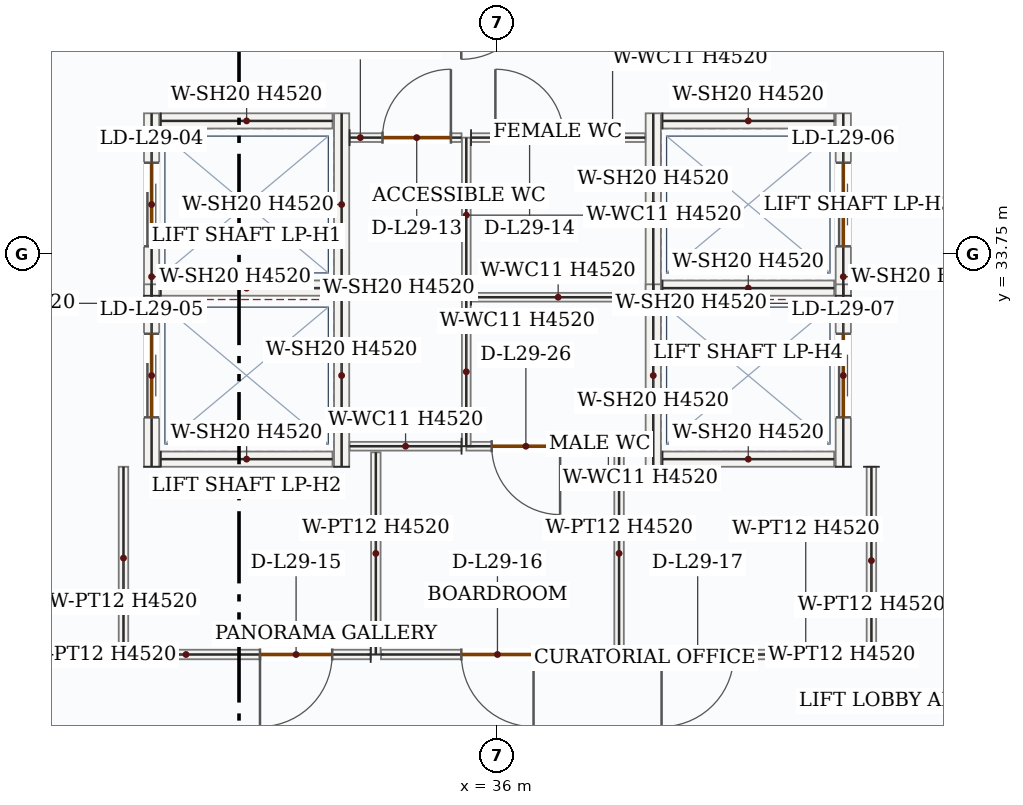
"""IFC4 building model, lengths in metres.
Left out: names, types, materials, properties, quantities, classifications, styles, units other than length and angle.
Written with IfcOpenShell. Run it as: python <this file> out.ifc"""

import sys

from ifc_helpers import new_model, si_unit, direction, frame, frame_2d, origin, place, context, subcontext, project, spatial, rectangle, extrude, source, transform, mapped, element, fill, save


model = new_model("IFC4")
c1 = context("Model", 3, precision=1e-05, world=origin(), true_north=direction((0.0, 1.0)))
c2 = subcontext(c1, "Body", "Model", "MODEL_VIEW")
j1 = project(units=[si_unit("LENGTHUNIT", "METRE"), si_unit("PLANEANGLEUNIT", "RADIAN")], contexts=[c1])
p1 = place(None, origin())
s1 = spatial("IfcSite", under=j1, at=p1, CompositionType="ELEMENT")
p2 = place(p1, origin())
s2 = spatial("IfcBuilding", under=s1, at=p2, CompositionType="ELEMENT")
p3 = place(p2, frame((0.0, 0.0, 130.8)))
s3 = spatial("IfcBuildingStorey", under=s2, at=p3, CompositionType="ELEMENT", Elevation=130.8)
p4 = place(p3, frame((31.45, 33.2, 0.0), z_axis=(0.0, 0.0, 1.0), x_axis=(0.0, 1.0, 0.0)))
e1 = element("IfcWall", 1, at=p4, inside=s3, PredefinedType="SOLIDWALL", context=c2, shape_type="SweptSolid", body=[
    extrude(rectangle(XDim=2.4, YDim=0.2, at=frame_2d((1.2, 0.0))), origin(), (0.0, 0.0, 1.0), 4.52),
])
p5 = place(p4, frame((0.65, 0.0, 0.0)))
e2 = element("IfcOpeningElement", 2, at=p5, cuts=e1, PredefinedType="OPENING", context=c2, shape_type="SweptSolid", body=[
    extrude(rectangle(XDim=1.1, YDim=2.15, at=frame_2d((0.55, 1.075))), frame((0.0, 0.11, 0.0), z_axis=(0.0, -1.0, 0.0), x_axis=(1.0, 0.0, 0.0)), (0.0, 0.0, 1.0), 0.22),
])
m1 = source(origin(), c2, "Body", "SweptSolid", [
    extrude(rectangle(XDim=2.4, YDim=0.2, at=frame_2d((1.2, 0.0))), origin(), (0.0, 0.0, 1.0), 4.52),
])
p6 = place(p3, frame((33.95, 33.2, 0.0), z_axis=(0.0, 0.0, 1.0), x_axis=(0.0, 1.0, 0.0)))
e3 = element("IfcWall", 3, at=p6, inside=s3, PredefinedType="SOLIDWALL", context=c2, shape_type="MappedRepresentation", body=[
    mapped(m1, transform((0.0, 0.0, 0.0), x_axis=(1.0, 0.0, 0.0), y_axis=(0.0, 1.0, 0.0), z_axis=(0.0, 0.0, 1.0), scale=1.0)),
])
m2 = source(origin(), c2, "Body", "SweptSolid", [
    extrude(rectangle(XDim=2.26, YDim=0.2, at=frame_2d((1.13, 0.0))), origin(), (0.0, 0.0, 1.0), 4.52),
])
for number, where, z_axis, x_axis in (
    (4, (31.57, 33.3, 0.0), (0.0, 0.0, 1.0), (1.0, 0.0, 0.0)),
    (5, (31.57, 35.5, 0.0), (0.0, 0.0, 1.0), (1.0, 0.0, 0.0)),
):
    element("IfcWall", number, at=place(p3, frame(where, z_axis=z_axis, x_axis=x_axis)), inside=s3, PredefinedType="SOLIDWALL", context=c2, shape_type="MappedRepresentation", body=[
        mapped(m2, transform((0.0, 0.0, 0.0), x_axis=(1.0, 0.0, 0.0), y_axis=(0.0, 1.0, 0.0), z_axis=(0.0, 0.0, 1.0), scale=1.0)),
    ])
p7 = place(p3, frame((31.45, 30.95, 0.0), z_axis=(0.0, 0.0, 1.0), x_axis=(0.0, 1.0, 0.0)))
e6 = element("IfcWall", 6, at=p7, inside=s3, PredefinedType="SOLIDWALL", context=c2, shape_type="SweptSolid", body=[
    extrude(rectangle(XDim=2.4, YDim=0.2, at=frame_2d((1.2, 0.0))), origin(), (0.0, 0.0, 1.0), 4.52),
])
p8 = place(p7, frame((0.65, 0.0, 0.0)))
e7 = element("IfcOpeningElement", 7, at=p8, cuts=e6, PredefinedType="OPENING", context=c2, shape_type="SweptSolid", body=[
    extrude(rectangle(XDim=1.1, YDim=2.15, at=frame_2d((0.55, 1.075))), frame((0.0, 0.11, 0.0), z_axis=(0.0, -1.0, 0.0), x_axis=(1.0, 0.0, 0.0)), (0.0, 0.0, 1.0), 0.22),
])
p9 = place(p3, frame((33.95, 30.95, 0.0), z_axis=(0.0, 0.0, 1.0), x_axis=(0.0, 1.0, 0.0)))
e8 = element("IfcWall", 8, at=p9, inside=s3, PredefinedType="SOLIDWALL", context=c2, shape_type="MappedRepresentation", body=[
    mapped(m1, transform((0.0, 0.0, 0.0), x_axis=(1.0, 0.0, 0.0), y_axis=(0.0, 1.0, 0.0), z_axis=(0.0, 0.0, 1.0), scale=1.0)),
])
p10 = place(p3, frame((31.57, 31.05, 0.0), z_axis=(0.0, 0.0, 1.0), x_axis=(1.0, 0.0, 0.0)))
e9 = element("IfcWall", 9, at=p10, inside=s3, PredefinedType="SOLIDWALL", context=c2, shape_type="MappedRepresentation", body=[
    mapped(m2, transform((0.0, 0.0, 0.0), x_axis=(1.0, 0.0, 0.0), y_axis=(0.0, 1.0, 0.0), z_axis=(0.0, 0.0, 1.0), scale=1.0)),
])
p11 = place(p3, frame((38.05, 33.2, 0.0), z_axis=(0.0, 0.0, 1.0), x_axis=(0.0, 1.0, 0.0)))
e10 = element("IfcWall", 10, at=p11, inside=s3, PredefinedType="SOLIDWALL", context=c2, shape_type="MappedRepresentation", body=[
    mapped(m1, transform((0.0, 0.0, 0.0), x_axis=(1.0, 0.0, 0.0), y_axis=(0.0, 1.0, 0.0), z_axis=(0.0, 0.0, 1.0), scale=1.0)),
])
p12 = place(p3, frame((40.55, 33.2, 0.0), z_axis=(0.0, 0.0, 1.0), x_axis=(0.0, 1.0, 0.0)))
e11 = element("IfcWall", 11, at=p12, inside=s3, PredefinedType="SOLIDWALL", context=c2, shape_type="SweptSolid", body=[
    extrude(rectangle(XDim=2.4, YDim=0.2, at=frame_2d((1.2, 0.0))), origin(), (0.0, 0.0, 1.0), 4.52),
])
p13 = place(p12, frame((0.65, 0.0, 0.0)))
e12 = element("IfcOpeningElement", 12, at=p13, cuts=e11, PredefinedType="OPENING", context=c2, shape_type="SweptSolid", body=[
    extrude(rectangle(XDim=1.1, YDim=2.15, at=frame_2d((0.55, 1.075))), frame((0.0, 0.11, 0.0), z_axis=(0.0, -1.0, 0.0), x_axis=(1.0, 0.0, 0.0)), (0.0, 0.0, 1.0), 0.22),
])
for number, where, z_axis, x_axis in (
    (13, (38.17, 33.3, 0.0), (0.0, 0.0, 1.0), (1.0, 0.0, 0.0)),
    (14, (38.17, 35.5, 0.0), (0.0, 0.0, 1.0), (1.0, 0.0, 0.0)),
):
    element("IfcWall", number, at=place(p3, frame(where, z_axis=z_axis, x_axis=x_axis)), inside=s3, PredefinedType="SOLIDWALL", context=c2, shape_type="MappedRepresentation", body=[
        mapped(m2, transform((0.0, 0.0, 0.0), x_axis=(1.0, 0.0, 0.0), y_axis=(0.0, 1.0, 0.0), z_axis=(0.0, 0.0, 1.0), scale=1.0)),
    ])
p14 = place(p3, frame((38.05, 30.95, 0.0), z_axis=(0.0, 0.0, 1.0), x_axis=(0.0, 1.0, 0.0)))
e15 = element("IfcWall", 15, at=p14, inside=s3, PredefinedType="SOLIDWALL", context=c2, shape_type="MappedRepresentation", body=[
    mapped(m1, transform((0.0, 0.0, 0.0), x_axis=(1.0, 0.0, 0.0), y_axis=(0.0, 1.0, 0.0), z_axis=(0.0, 0.0, 1.0), scale=1.0)),
])
p15 = place(p3, frame((40.55, 30.95, 0.0), z_axis=(0.0, 0.0, 1.0), x_axis=(0.0, 1.0, 0.0)))
e16 = element("IfcWall", 16, at=p15, inside=s3, PredefinedType="SOLIDWALL", context=c2, shape_type="SweptSolid", body=[
    extrude(rectangle(XDim=2.4, YDim=0.2, at=frame_2d((1.2, 0.0))), origin(), (0.0, 0.0, 1.0), 4.52),
])
p16 = place(p15, frame((0.65, 0.0, 0.0)))
e17 = element("IfcOpeningElement", 17, at=p16, cuts=e16, PredefinedType="OPENING", context=c2, shape_type="SweptSolid", body=[
    extrude(rectangle(XDim=1.1, YDim=2.15, at=frame_2d((0.55, 1.075))), frame((0.0, 0.11, 0.0), z_axis=(0.0, -1.0, 0.0), x_axis=(1.0, 0.0, 0.0)), (0.0, 0.0, 1.0), 0.22),
])
p17 = place(p3, frame((38.17, 31.05, 0.0), z_axis=(0.0, 0.0, 1.0), x_axis=(1.0, 0.0, 0.0)))
e18 = element("IfcWall", 18, at=p17, inside=s3, PredefinedType="SOLIDWALL", context=c2, shape_type="MappedRepresentation", body=[
    mapped(m2, transform((0.0, 0.0, 0.0), x_axis=(1.0, 0.0, 0.0), y_axis=(0.0, 1.0, 0.0), z_axis=(0.0, 0.0, 1.0), scale=1.0)),
])
p18 = place(p3, frame((37.945, 31.22, 0.0), z_axis=(0.0, 0.0, 1.0), x_axis=(-1.0, 0.0, 0.0)))
e19 = element("IfcWall", 19, at=p18, inside=s3, PredefinedType="PARTITIONING", context=c2, shape_type="SweptSolid", body=[
    extrude(rectangle(XDim=2.355, YDim=0.115, at=frame_2d((1.177, 0.0))), origin(), (0.0, 0.0, 1.0), 4.52),
])
p19 = place(p18, frame((1.121, 0.0, 0.0)))
e20 = element("IfcOpeningElement", 20, at=p19, cuts=e19, PredefinedType="OPENING", context=c2, shape_type="SweptSolid", body=[
    extrude(rectangle(XDim=0.9, YDim=2.1, at=frame_2d((0.45, 1.05))), frame((0.0, 0.067, 0.0), z_axis=(0.0, -1.0, 0.0), x_axis=(1.0, 0.0, 0.0)), (0.0, 0.0, 1.0), 0.135),
])
m3 = source(origin(), c2, "Body", "SweptSolid", [
    extrude(rectangle(XDim=1.96, YDim=0.115, at=frame_2d((0.98, 0.0))), origin(), (0.0, 0.0, 1.0), 4.52),
])
p20 = place(p3, frame((35.59, 31.22, 0.0), z_axis=(0.0, 0.0, 1.0), x_axis=(0.0, 1.0, 0.0)))
e21 = element("IfcWall", 21, at=p20, inside=s3, PredefinedType="PARTITIONING", context=c2, shape_type="MappedRepresentation", body=[
    mapped(m3, transform((0.0, 0.0, 0.0), x_axis=(1.0, 0.0, 0.0), y_axis=(0.0, 1.0, 0.0), z_axis=(0.0, 0.0, 1.0), scale=1.0)),
])
m4 = source(origin(), c2, "Body", "SweptSolid", [
    extrude(rectangle(XDim=2.292, YDim=0.115, at=frame_2d((1.146, 0.0))), origin(), (0.0, 0.0, 1.0), 4.52),
])
p21 = place(p3, frame((35.653, 33.18, 0.0), z_axis=(0.0, 0.0, 1.0), x_axis=(1.0, 0.0, 0.0)))
e22 = element("IfcWall", 22, at=p21, inside=s3, PredefinedType="PARTITIONING", context=c2, shape_type="MappedRepresentation", body=[
    mapped(m4, transform((0.0, 0.0, 0.0), x_axis=(1.0, 0.0, 0.0), y_axis=(0.0, 1.0, 0.0), z_axis=(0.0, 0.0, 1.0), scale=1.0)),
])
m5 = source(origin(), c2, "Body", "SweptSolid", [
    extrude(rectangle(XDim=2.04, YDim=0.115, at=frame_2d((1.02, 0.0))), origin(), (0.0, 0.0, 1.0), 4.52),
])
p22 = place(p3, frame((35.59, 33.24, 0.0), z_axis=(0.0, 0.0, 1.0), x_axis=(0.0, 1.0, 0.0)))
e23 = element("IfcWall", 23, at=p22, inside=s3, PredefinedType="PARTITIONING", context=c2, shape_type="MappedRepresentation", body=[
    mapped(m5, transform((0.0, 0.0, 0.0), x_axis=(1.0, 0.0, 0.0), y_axis=(0.0, 1.0, 0.0), z_axis=(0.0, 0.0, 1.0), scale=1.0)),
])
p23 = place(p3, frame((35.653, 35.28, 0.0), z_axis=(0.0, 0.0, 1.0), x_axis=(1.0, 0.0, 0.0)))
e24 = element("IfcWall", 24, at=p23, inside=s3, PredefinedType="PARTITIONING", context=c2, shape_type="SweptSolid", body=[
    extrude(rectangle(XDim=2.292, YDim=0.115, at=frame_2d((1.146, 0.0))), origin(), (0.0, 0.0, 1.0), 4.52),
])
p24 = place(p23, frame((0.32, 0.0, 0.0)))
e25 = element("IfcOpeningElement", 25, at=p24, cuts=e24, PredefinedType="OPENING", context=c2, shape_type="SweptSolid", body=[
    extrude(rectangle(XDim=0.9, YDim=2.1, at=frame_2d((0.45, 1.05))), frame((0.0, 0.067, 0.0), z_axis=(0.0, -1.0, 0.0), x_axis=(1.0, 0.0, 0.0)), (0.0, 0.0, 1.0), 0.135),
])
m6 = source(origin(), c2, "Body", "SweptSolid", [
    extrude(rectangle(XDim=1.473, YDim=0.115, at=frame_2d((0.736, 0.0))), origin(), (0.0, 0.0, 1.0), 4.52),
])
p25 = place(p3, frame((35.528, 31.22, 0.0), z_axis=(0.0, 0.0, 1.0), x_axis=(-1.0, 0.0, 0.0)))
e26 = element("IfcWall", 26, at=p25, inside=s3, PredefinedType="PARTITIONING", context=c2, shape_type="MappedRepresentation", body=[
    mapped(m6, transform((0.0, 0.0, 0.0), x_axis=(1.0, 0.0, 0.0), y_axis=(0.0, 1.0, 0.0), z_axis=(0.0, 0.0, 1.0), scale=1.0)),
])
p26 = place(p3, frame((34.055, 35.28, 0.0), z_axis=(0.0, 0.0, 1.0), x_axis=(1.0, 0.0, 0.0)))
e27 = element("IfcWall", 27, at=p26, inside=s3, PredefinedType="PARTITIONING", context=c2, shape_type="SweptSolid", body=[
    extrude(rectangle(XDim=1.473, YDim=0.115, at=frame_2d((0.736, 0.0))), origin(), (0.0, 0.0, 1.0), 4.52),
])
p27 = place(p26, frame((0.433, 0.0, 0.0)))
e28 = element("IfcOpeningElement", 28, at=p27, cuts=e27, PredefinedType="OPENING", context=c2, shape_type="SweptSolid", body=[
    extrude(rectangle(XDim=0.9, YDim=2.1, at=frame_2d((0.45, 1.05))), frame((0.0, 0.067, 0.0), z_axis=(0.0, -1.0, 0.0), x_axis=(1.0, 0.0, 0.0)), (0.0, 0.0, 1.0), 0.135),
])
m7 = source(origin(), c2, "Body", "SweptSolid", [
    extrude(rectangle(XDim=2.66, YDim=0.125, at=frame_2d((1.33, 0.0))), origin(), (0.0, 0.0, 1.0), 4.52),
])
for number, where, z_axis, x_axis in (
    (29, (34.4, 28.48, 0.0), (0.0, 0.0, 1.0), (0.0, 1.0, 0.0)),
    (30, (37.6, 31.14, 0.0), (0.0, 0.0, 1.0), (0.0, -1.0, 0.0)),
):
    element("IfcWall", number, at=place(p3, frame(where, z_axis=z_axis, x_axis=x_axis)), inside=s3, PredefinedType="PARTITIONING", context=c2, shape_type="MappedRepresentation", body=[
        mapped(m7, transform((0.0, 0.0, 0.0), x_axis=(1.0, 0.0, 0.0), y_axis=(0.0, 1.0, 0.0), z_axis=(0.0, 0.0, 1.0), scale=1.0)),
    ])
p28 = place(p3, frame((37.532, 28.48, 0.0), z_axis=(0.0, 0.0, 1.0), x_axis=(-1.0, 0.0, 0.0)))
e31 = element("IfcWall", 31, at=p28, inside=s3, PredefinedType="PARTITIONING", context=c2, shape_type="SweptSolid", body=[
    extrude(rectangle(XDim=3.065, YDim=0.125, at=frame_2d((1.532, 0.0))), origin(), (0.0, 0.0, 1.0), 4.52),
])
p29 = place(p28, frame((1.058, 0.0, 0.0)))
e32 = element("IfcOpeningElement", 32, at=p29, cuts=e31, PredefinedType="OPENING", context=c2, shape_type="SweptSolid", body=[
    extrude(rectangle(XDim=0.95, YDim=2.15, at=frame_2d((0.475, 1.075))), frame((0.0, 0.073, 0.0), z_axis=(0.0, -1.0, 0.0), x_axis=(1.0, 0.0, 0.0)), (0.0, 0.0, 1.0), 0.145),
])
p30 = place(p3, frame((34.333, 28.48, 0.0), z_axis=(0.0, 0.0, 1.0), x_axis=(-1.0, 0.0, 0.0)))
e33 = element("IfcWall", 33, at=p30, inside=s3, PredefinedType="PARTITIONING", context=c2, shape_type="SweptSolid", body=[
    extrude(rectangle(XDim=3.252, YDim=0.125, at=frame_2d((1.626, 0.0))), origin(), (0.0, 0.0, 1.0), 4.52),
])
p31 = place(p30, frame((0.507, 0.0, 0.0)))
e34 = element("IfcOpeningElement", 34, at=p31, cuts=e33, PredefinedType="OPENING", context=c2, shape_type="SweptSolid", body=[
    extrude(rectangle(XDim=0.95, YDim=2.15, at=frame_2d((0.475, 1.075))), frame((0.0, 0.073, 0.0), z_axis=(0.0, -1.0, 0.0), x_axis=(1.0, 0.0, 0.0)), (0.0, 0.0, 1.0), 0.145),
])
m8 = source(origin(), c2, "Body", "SweptSolid", [
    extrude(rectangle(XDim=2.402, YDim=0.125, at=frame_2d((1.201, 0.0))), origin(), (0.0, 0.0, 1.0), 4.52),
])
p32 = place(p3, frame((31.08, 28.548, 0.0), z_axis=(0.0, 0.0, 1.0), x_axis=(0.0, 1.0, 0.0)))
e35 = element("IfcWall", 35, at=p32, inside=s3, PredefinedType="PARTITIONING", context=c2, shape_type="MappedRepresentation", body=[
    mapped(m8, transform((0.0, 0.0, 0.0), x_axis=(1.0, 0.0, 0.0), y_axis=(0.0, 1.0, 0.0), z_axis=(0.0, 0.0, 1.0), scale=1.0)),
])
m9 = source(origin(), c2, "Body", "SweptSolid", [
    extrude(rectangle(XDim=2.47, YDim=0.125, at=frame_2d((1.235, 0.0))), origin(), (0.0, 0.0, 1.0), 4.52),
])
p33 = place(p3, frame((40.92, 30.95, 0.0), z_axis=(0.0, 0.0, 1.0), x_axis=(0.0, -1.0, 0.0)))
e36 = element("IfcWall", 36, at=p33, inside=s3, PredefinedType="PARTITIONING", context=c2, shape_type="MappedRepresentation", body=[
    mapped(m9, transform((0.0, 0.0, 0.0), x_axis=(1.0, 0.0, 0.0), y_axis=(0.0, 1.0, 0.0), z_axis=(0.0, 0.0, 1.0), scale=1.0)),
])
p34 = place(p3, frame((40.853, 28.48, 0.0), z_axis=(0.0, 0.0, 1.0), x_axis=(-1.0, 0.0, 0.0)))
e37 = element("IfcWall", 37, at=p34, inside=s3, PredefinedType="PARTITIONING", context=c2, shape_type="SweptSolid", body=[
    extrude(rectangle(XDim=3.185, YDim=0.125, at=frame_2d((1.593, 0.0))), origin(), (0.0, 0.0, 1.0), 4.52),
])
p35 = place(p34, frame((1.743, 0.0, 0.0)))
e38 = element("IfcOpeningElement", 38, at=p35, cuts=e37, PredefinedType="OPENING", context=c2, shape_type="SweptSolid", body=[
    extrude(rectangle(XDim=0.95, YDim=2.15, at=frame_2d((0.475, 1.075))), frame((0.0, 0.073, 0.0), z_axis=(0.0, -1.0, 0.0), x_axis=(1.0, 0.0, 0.0)), (0.0, 0.0, 1.0), 0.145),
])
m10 = source(origin(), c2, "Body", "SweptSolid", [
    extrude(rectangle(XDim=1.1, YDim=2.15, at=frame_2d((0.55, 1.075))), frame((0.0, 0.025, 0.0), z_axis=(0.0, -1.0, 0.0), x_axis=(1.0, 0.0, 0.0)), (0.0, 0.0, 1.0), 0.05),
])
p36 = place(p5, origin())
e39 = element("IfcDoor", 39, at=p36, inside=s3, OperationType="DOUBLE_DOOR_SLIDING", PredefinedType="DOOR", context=c2, shape_type="MappedRepresentation", body=[
    mapped(m10, transform((0.0, 0.0, 0.0), x_axis=(1.0, 0.0, 0.0), y_axis=(0.0, 1.0, 0.0), z_axis=(0.0, 0.0, 1.0), scale=1.0)),
])
fill(e2, e39)
p37 = place(p8, origin())
e40 = element("IfcDoor", 40, at=p37, inside=s3, OperationType="DOUBLE_DOOR_SLIDING", PredefinedType="DOOR", context=c2, shape_type="MappedRepresentation", body=[
    mapped(m10, transform((0.0, 0.0, 0.0), x_axis=(1.0, 0.0, 0.0), y_axis=(0.0, 1.0, 0.0), z_axis=(0.0, 0.0, 1.0), scale=1.0)),
])
fill(e7, e40)
p38 = place(p13, origin())
e41 = element("IfcDoor", 41, at=p38, inside=s3, OperationType="DOUBLE_DOOR_SLIDING", PredefinedType="DOOR", context=c2, shape_type="MappedRepresentation", body=[
    mapped(m10, transform((0.0, 0.0, 0.0), x_axis=(1.0, 0.0, 0.0), y_axis=(0.0, 1.0, 0.0), z_axis=(0.0, 0.0, 1.0), scale=1.0)),
])
fill(e12, e41)
p39 = place(p16, origin())
e42 = element("IfcDoor", 42, at=p39, inside=s3, OperationType="DOUBLE_DOOR_SLIDING", PredefinedType="DOOR", context=c2, shape_type="MappedRepresentation", body=[
    mapped(m10, transform((0.0, 0.0, 0.0), x_axis=(1.0, 0.0, 0.0), y_axis=(0.0, 1.0, 0.0), z_axis=(0.0, 0.0, 1.0), scale=1.0)),
])
fill(e17, e42)
m11 = source(origin(), c2, "Body", "SweptSolid", [
    extrude(rectangle(XDim=0.9, YDim=2.1, at=frame_2d((0.45, 1.05))), frame((0.0, 0.025, 0.0), z_axis=(0.0, -1.0, 0.0), x_axis=(1.0, 0.0, 0.0)), (0.0, 0.0, 1.0), 0.05),
])
p40 = place(p27, origin())
e43 = element("IfcDoor", 43, at=p40, inside=s3, OperationType="SINGLE_SWING_RIGHT", PredefinedType="DOOR", context=c2, shape_type="MappedRepresentation", body=[
    mapped(m11, transform((0.0, 0.0, 0.0), x_axis=(1.0, 0.0, 0.0), y_axis=(0.0, 1.0, 0.0), z_axis=(0.0, 0.0, 1.0), scale=1.0)),
])
fill(e28, e43)
p41 = place(p24, origin())
e44 = element("IfcDoor", 44, at=p41, inside=s3, OperationType="SINGLE_SWING_LEFT", PredefinedType="DOOR", context=c2, shape_type="MappedRepresentation", body=[
    mapped(m11, transform((0.0, 0.0, 0.0), x_axis=(1.0, 0.0, 0.0), y_axis=(0.0, 1.0, 0.0), z_axis=(0.0, 0.0, 1.0), scale=1.0)),
])
fill(e25, e44)
m12 = source(origin(), c2, "Body", "SweptSolid", [
    extrude(rectangle(XDim=0.95, YDim=2.15, at=frame_2d((0.475, 1.075))), frame((0.0, 0.025, 0.0), z_axis=(0.0, -1.0, 0.0), x_axis=(1.0, 0.0, 0.0)), (0.0, 0.0, 1.0), 0.05),
])
p42 = place(p31, origin())
e45 = element("IfcDoor", 45, at=p42, inside=s3, OperationType="SINGLE_SWING_RIGHT", PredefinedType="DOOR", context=c2, shape_type="MappedRepresentation", body=[
    mapped(m12, transform((0.0, 0.0, 0.0), x_axis=(1.0, 0.0, 0.0), y_axis=(0.0, 1.0, 0.0), z_axis=(0.0, 0.0, 1.0), scale=1.0)),
])
fill(e34, e45)
p43 = place(p29, origin())
e46 = element("IfcDoor", 46, at=p43, inside=s3, OperationType="SINGLE_SWING_LEFT", PredefinedType="DOOR", context=c2, shape_type="MappedRepresentation", body=[
    mapped(m12, transform((0.0, 0.0, 0.0), x_axis=(1.0, 0.0, 0.0), y_axis=(0.0, 1.0, 0.0), z_axis=(0.0, 0.0, 1.0), scale=1.0)),
])
fill(e32, e46)
p44 = place(p35, origin())
e47 = element("IfcDoor", 47, at=p44, inside=s3, OperationType="SINGLE_SWING_RIGHT", PredefinedType="DOOR", context=c2, shape_type="MappedRepresentation", body=[
    mapped(m12, transform((0.0, 0.0, 0.0), x_axis=(1.0, 0.0, 0.0), y_axis=(0.0, 1.0, 0.0), z_axis=(0.0, 0.0, 1.0), scale=1.0)),
])
fill(e38, e47)
p45 = place(p19, origin())
e48 = element("IfcDoor", 48, at=p45, inside=s3, OperationType="SINGLE_SWING_LEFT", PredefinedType="DOOR", context=c2, shape_type="MappedRepresentation", body=[
    mapped(m11, transform((0.0, 0.0, 0.0), x_axis=(1.0, 0.0, 0.0), y_axis=(0.0, 1.0, 0.0), z_axis=(0.0, 0.0, 1.0), scale=1.0)),
])
fill(e20, e48)
save(model, sys.argv[1])
